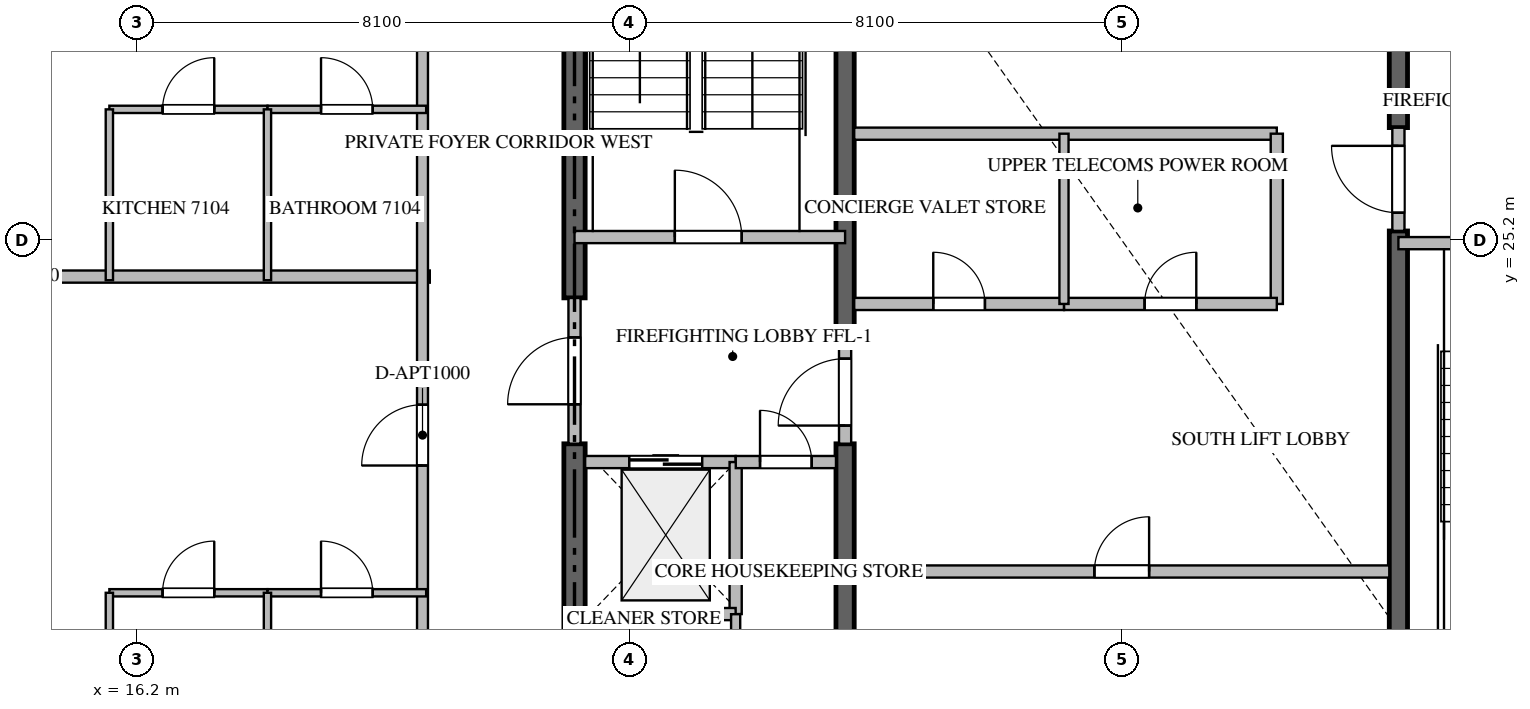
"""IFC4 building model, lengths in metres.
Left out: names, types, materials, properties, quantities, classifications, styles, units other than length and angle.
Written with IfcOpenShell. Run it as: python <this file> out.ifc"""

import sys

from ifc_helpers import new_model, si_unit, direction, frame, frame_2d, origin, place, context, subcontext, project, spatial, rectangle, extrude, source, transform, mapped, element, fill, save


model = new_model("IFC4")
c1 = context("Model", 3, precision=1e-05, world=origin(), true_north=direction((0.0, 1.0)))
c2 = subcontext(c1, "Body", "Model", "MODEL_VIEW")
j1 = project(units=[si_unit("LENGTHUNIT", "METRE"), si_unit("PLANEANGLEUNIT", "RADIAN")], contexts=[c1])
p1 = place(None, origin())
s1 = spatial("IfcSite", under=j1, at=p1, CompositionType="ELEMENT")
p2 = place(p1, origin())
s2 = spatial("IfcBuilding", under=s1, at=p2, CompositionType="ELEMENT")
p3 = place(p2, frame((0.0, 0.0, 283.6)))
s3 = spatial("IfcBuildingStorey", under=s2, at=p3, CompositionType="ELEMENT", Elevation=283.6)
p4 = place(p3, frame((23.4, 16.975, -0.26), z_axis=(0.0, 0.0, 1.0), x_axis=(0.0, 1.0, 0.0)))
e1 = element("IfcWall", 1, at=p4, inside=s3, PredefinedType="SHEAR", context=c2, shape_type="SweptSolid", body=[
    extrude(rectangle(XDim=4.875, YDim=0.35, at=frame_2d((2.438, 0.0))), origin(), (0.0, 0.0, 1.0), 3.668),
])
p5 = place(p3, frame((23.4, 24.25, -0.26), z_axis=(0.0, 0.0, 1.0), x_axis=(0.0, 1.0, 0.0)))
e2 = element("IfcWall", 2, at=p5, inside=s3, PredefinedType="SHEAR", context=c2, shape_type="SweptSolid", body=[
    extrude(rectangle(XDim=9.175, YDim=0.35, at=frame_2d((4.587, 0.0))), origin(), (0.0, 0.0, 1.0), 3.668),
])
p6 = place(p3, frame((27.85, 16.975, -0.26), z_axis=(0.0, 0.0, 1.0), x_axis=(0.0, 1.0, 0.0)))
e3 = element("IfcWall", 3, at=p6, inside=s3, PredefinedType="SHEAR", context=c2, shape_type="SweptSolid", body=[
    extrude(rectangle(XDim=4.875, YDim=0.3, at=frame_2d((2.438, 0.0))), origin(), (0.0, 0.0, 1.0), 3.668),
])
p7 = place(p3, frame((27.85, 23.55, -0.26), z_axis=(0.0, 0.0, 1.0), x_axis=(0.0, 1.0, 0.0)))
e4 = element("IfcWall", 4, at=p7, inside=s3, PredefinedType="SHEAR", context=c2, shape_type="SweptSolid", body=[
    extrude(rectangle(XDim=9.875, YDim=0.3, at=frame_2d((4.938, 0.0))), origin(), (0.0, 0.0, 1.0), 3.668),
])
p8 = place(p3, frame((36.95, 16.975, -0.26), z_axis=(0.0, 0.0, 1.0), x_axis=(0.0, 1.0, 0.0)))
e5 = element("IfcWall", 5, at=p8, inside=s3, PredefinedType="SHEAR", context=c2, shape_type="SweptSolid", body=[
    extrude(rectangle(XDim=8.375, YDim=0.3, at=frame_2d((4.188, 0.0))), origin(), (0.0, 0.0, 1.0), 3.668),
])
p9 = place(p3, frame((36.95, 27.05, -0.26), z_axis=(0.0, 0.0, 1.0), x_axis=(0.0, 1.0, 0.0)))
e6 = element("IfcWall", 6, at=p9, inside=s3, PredefinedType="SHEAR", context=c2, shape_type="SweptSolid", body=[
    extrude(rectangle(XDim=6.375, YDim=0.3, at=frame_2d((3.188, 0.0))), origin(), (0.0, 0.0, 1.0), 3.668),
])
p10 = place(p3, frame((23.4, 25.25, 0.0), z_axis=(0.0, 0.0, 1.0), x_axis=(1.0, 0.0, 0.0)))
e7 = element("IfcWall", 7, at=p10, inside=s3, PredefinedType="STANDARD", context=c2, shape_type="SweptSolid", body=[
    extrude(rectangle(XDim=4.45, YDim=0.2, at=frame_2d((2.225, 0.0))), origin(), (0.0, 0.0, 1.0), 3.41),
])
p11 = place(p10, frame((1.65, 0.0, 0.0)))
e8 = element("IfcOpeningElement", 8, at=p11, cuts=e7, PredefinedType="OPENING", context=c2, shape_type="SweptSolid", body=[
    extrude(rectangle(XDim=1.1, YDim=2.15, at=frame_2d((0.55, 1.075))), frame((0.0, 0.11, 0.0), z_axis=(0.0, -1.0, 0.0), x_axis=(1.0, 0.0, 0.0)), (0.0, 0.0, 1.0), 0.22),
])
p12 = place(p3, frame((36.95, 25.15, 0.0), z_axis=(0.0, 0.0, 1.0), x_axis=(1.0, 0.0, 0.0)))
e9 = element("IfcWall", 9, at=p12, inside=s3, PredefinedType="STANDARD", context=c2, shape_type="SweptSolid", body=[
    extrude(rectangle(XDim=4.45, YDim=0.2, at=frame_2d((2.225, 0.0))), origin(), (0.0, 0.0, 1.0), 3.41),
])
p13 = place(p12, frame((1.65, 0.0, 0.0)))
e10 = element("IfcOpeningElement", 10, at=p13, cuts=e9, PredefinedType="OPENING", context=c2, shape_type="SweptSolid", body=[
    extrude(rectangle(XDim=1.1, YDim=2.15, at=frame_2d((0.55, 1.075))), frame((0.0, 0.11, 0.0), z_axis=(0.0, -1.0, 0.0), x_axis=(1.0, 0.0, 0.0)), (0.0, 0.0, 1.0), 0.22),
])
p14 = place(p3, frame((23.575, 21.55, 0.0), z_axis=(0.0, 0.0, 1.0), x_axis=(1.0, 0.0, 0.0)))
e11 = element("IfcWall", 11, at=p14, inside=s3, PredefinedType="STANDARD", context=c2, shape_type="SweptSolid", body=[
    extrude(rectangle(XDim=2.475, YDim=0.2, at=frame_2d((1.238, 0.0))), origin(), (0.0, 0.0, 1.0), 3.41),
])
p15 = place(p14, frame((0.725, 0.0, 0.0)))
e12 = element("IfcOpeningElement", 12, at=p15, cuts=e11, PredefinedType="OPENING", context=c2, shape_type="SweptSolid", body=[
    extrude(rectangle(XDim=1.2, YDim=2.2, at=frame_2d((0.6, 1.1))), frame((0.0, 0.11, 0.0), z_axis=(0.0, -1.0, 0.0), x_axis=(1.0, 0.0, 0.0)), (0.0, 0.0, 1.0), 0.22),
])
p16 = place(p3, frame((26.05, 19.05, 0.0), z_axis=(0.0, 0.0, 1.0), x_axis=(0.0, 1.0, 0.0)))
e13 = element("IfcWall", 13, at=p16, inside=s3, PredefinedType="STANDARD", context=c2, shape_type="SweptSolid", body=[
    extrude(rectangle(XDim=2.5, YDim=0.2, at=frame_2d((1.25, 0.0))), origin(), (0.0, 0.0, 1.0), 3.41),
])
p17 = place(p3, frame((23.575, 19.05, 0.0), z_axis=(0.0, 0.0, 1.0), x_axis=(1.0, 0.0, 0.0)))
e14 = element("IfcWall", 14, at=p17, inside=s3, PredefinedType="STANDARD", context=c2, shape_type="SweptSolid", body=[
    extrude(rectangle(XDim=2.475, YDim=0.2, at=frame_2d((1.238, 0.0))), origin(), (0.0, 0.0, 1.0), 3.41),
])
p18 = place(p3, frame((26.052, 21.55, 0.0), z_axis=(0.0, 0.0, 1.0), x_axis=(1.0, 0.0, 0.0)))
e15 = element("IfcWall", 15, at=p18, inside=s3, PredefinedType="STANDARD", context=c2, shape_type="SweptSolid", body=[
    extrude(rectangle(XDim=1.648, YDim=0.2, at=frame_2d((0.824, 0.0))), origin(), (0.0, 0.0, 1.0), 3.41),
])
p19 = place(p18, frame((0.399, 0.0, 0.0)))
e16 = element("IfcOpeningElement", 16, at=p19, cuts=e15, PredefinedType="OPENING", context=c2, shape_type="SweptSolid", body=[
    extrude(rectangle(XDim=0.85, YDim=2.1, at=frame_2d((0.425, 1.05))), frame((0.0, 0.11, 0.0), z_axis=(0.0, -1.0, 0.0), x_axis=(1.0, 0.0, 0.0)), (0.0, 0.0, 1.0), 0.22),
])
p20 = place(p3, frame((23.4, 21.852, 0.0), z_axis=(0.0, 0.0, 1.0), x_axis=(0.0, 1.0, 0.0)))
e17 = element("IfcWall", 17, at=p20, inside=s3, PredefinedType="STANDARD", context=c2, shape_type="SweptSolid", body=[
    extrude(rectangle(XDim=2.396, YDim=0.2, at=frame_2d((1.198, 0.0))), origin(), (0.0, 0.0, 1.0), 3.41),
])
p21 = place(p20, frame((0.648, 0.0, 0.0)))
e18 = element("IfcOpeningElement", 18, at=p21, cuts=e17, PredefinedType="OPENING", context=c2, shape_type="SweptSolid", body=[
    extrude(rectangle(XDim=1.1, YDim=2.15, at=frame_2d((0.55, 1.075))), frame((0.0, 0.11, 0.0), z_axis=(0.0, -1.0, 0.0), x_axis=(1.0, 0.0, 0.0)), (0.0, 0.0, 1.0), 0.22),
])
p22 = place(p3, frame((27.85, 21.852, 0.0), z_axis=(0.0, 0.0, 1.0), x_axis=(0.0, 1.0, 0.0)))
e19 = element("IfcWall", 19, at=p22, inside=s3, PredefinedType="STANDARD", context=c2, shape_type="SweptSolid", body=[
    extrude(rectangle(XDim=1.696, YDim=0.2, at=frame_2d((0.848, 0.0))), origin(), (0.0, 0.0, 1.0), 3.41),
])
p23 = place(p22, frame((0.298, 0.0, 0.0)))
e20 = element("IfcOpeningElement", 20, at=p23, cuts=e19, PredefinedType="OPENING", context=c2, shape_type="SweptSolid", body=[
    extrude(rectangle(XDim=1.1, YDim=2.15, at=frame_2d((0.55, 1.075))), frame((0.0, 0.11, 0.0), z_axis=(0.0, -1.0, 0.0), x_axis=(1.0, 0.0, 0.0)), (0.0, 0.0, 1.0), 0.22),
])
p24 = place(p3, frame((36.95, 25.352, 0.0), z_axis=(0.0, 0.0, 1.0), x_axis=(0.0, 1.0, 0.0)))
e21 = element("IfcWall", 21, at=p24, inside=s3, PredefinedType="STANDARD", context=c2, shape_type="SweptSolid", body=[
    extrude(rectangle(XDim=1.696, YDim=0.2, at=frame_2d((0.848, 0.0))), origin(), (0.0, 0.0, 1.0), 3.41),
])
p25 = place(p24, frame((0.298, 0.0, 0.0)))
e22 = element("IfcOpeningElement", 22, at=p25, cuts=e21, PredefinedType="OPENING", context=c2, shape_type="SweptSolid", body=[
    extrude(rectangle(XDim=1.1, YDim=2.15, at=frame_2d((0.55, 1.075))), frame((0.0, 0.11, 0.0), z_axis=(0.0, -1.0, 0.0), x_axis=(1.0, 0.0, 0.0)), (0.0, 0.0, 1.0), 0.22),
])
p26 = place(p3, frame((26.05, 16.975, 0.0), z_axis=(0.0, 0.0, 1.0), x_axis=(0.0, 1.0, 0.0)))
e23 = element("IfcWall", 23, at=p26, inside=s3, PredefinedType="PARTITIONING", context=c2, shape_type="SweptSolid", body=[
    extrude(rectangle(XDim=2.073, YDim=0.15, at=frame_2d((1.037, 0.0))), origin(), (0.0, 0.0, 1.0), 3.41),
])
p27 = place(p26, frame((0.611, 0.0, 0.0)))
e24 = element("IfcOpeningElement", 24, at=p27, cuts=e23, PredefinedType="OPENING", context=c2, shape_type="SweptSolid", body=[
    extrude(rectangle(XDim=0.85, YDim=2.1, at=frame_2d((0.425, 1.05))), frame((0.0, 0.085, 0.0), z_axis=(0.0, -1.0, 0.0), x_axis=(1.0, 0.0, 0.0)), (0.0, 0.0, 1.0), 0.17),
])
p28 = place(p3, frame((28.0, 19.75, 0.0), z_axis=(0.0, 0.0, 1.0), x_axis=(1.0, 0.0, 0.0)))
e25 = element("IfcWall", 25, at=p28, inside=s3, PredefinedType="STANDARD", context=c2, shape_type="SweptSolid", body=[
    extrude(rectangle(XDim=8.8, YDim=0.2, at=frame_2d((4.4, 0.0))), origin(), (0.0, 0.0, 1.0), 3.41),
])
p29 = place(p28, frame((3.95, 0.0, 0.0)))
e26 = element("IfcOpeningElement", 26, at=p29, cuts=e25, PredefinedType="OPENING", context=c2, shape_type="SweptSolid", body=[
    extrude(rectangle(XDim=0.9, YDim=2.1, at=frame_2d((0.45, 1.05))), frame((0.0, 0.11, 0.0), z_axis=(0.0, -1.0, 0.0), x_axis=(1.0, 0.0, 0.0)), (0.0, 0.0, 1.0), 0.22),
])
p30 = place(p3, frame((28.0, 26.95, 0.0), z_axis=(0.0, 0.0, 1.0), x_axis=(1.0, 0.0, 0.0)))
e27 = element("IfcWall", 27, at=p30, inside=s3, PredefinedType="STANDARD", context=c2, shape_type="SweptSolid", body=[
    extrude(rectangle(XDim=6.95, YDim=0.2, at=frame_2d((3.475, 0.0))), origin(), (0.0, 0.0, 1.0), 3.41),
])
p31 = place(p3, frame((34.95, 24.15, 0.0), z_axis=(0.0, 0.0, 1.0), x_axis=(0.0, 1.0, 0.0)))
e28 = element("IfcWall", 28, at=p31, inside=s3, PredefinedType="STANDARD", context=c2, shape_type="SweptSolid", body=[
    extrude(rectangle(XDim=2.8, YDim=0.2, at=frame_2d((1.4, 0.0))), origin(), (0.0, 0.0, 1.0), 3.41),
])
p32 = place(p3, frame((28.0, 24.15, 0.0), z_axis=(0.0, 0.0, 1.0), x_axis=(1.0, 0.0, 0.0)))
e29 = element("IfcWall", 29, at=p32, inside=s3, PredefinedType="STANDARD", context=c2, shape_type="SweptSolid", body=[
    extrude(rectangle(XDim=3.45, YDim=0.2, at=frame_2d((1.725, 0.0))), origin(), (0.0, 0.0, 1.0), 3.41),
])
p33 = place(p32, frame((1.3, 0.0, 0.0)))
e30 = element("IfcOpeningElement", 30, at=p33, cuts=e29, PredefinedType="OPENING", context=c2, shape_type="SweptSolid", body=[
    extrude(rectangle(XDim=0.85, YDim=2.1, at=frame_2d((0.425, 1.05))), frame((0.0, 0.11, 0.0), z_axis=(0.0, -1.0, 0.0), x_axis=(1.0, 0.0, 0.0)), (0.0, 0.0, 1.0), 0.22),
])
p34 = place(p3, frame((31.452, 24.15, 0.0), z_axis=(0.0, 0.0, 1.0), x_axis=(1.0, 0.0, 0.0)))
e31 = element("IfcWall", 31, at=p34, inside=s3, PredefinedType="STANDARD", context=c2, shape_type="SweptSolid", body=[
    extrude(rectangle(XDim=3.498, YDim=0.2, at=frame_2d((1.749, 0.0))), origin(), (0.0, 0.0, 1.0), 3.41),
])
p35 = place(p34, frame((1.324, 0.0, 0.0)))
e32 = element("IfcOpeningElement", 32, at=p35, cuts=e31, PredefinedType="OPENING", context=c2, shape_type="SweptSolid", body=[
    extrude(rectangle(XDim=0.85, YDim=2.1, at=frame_2d((0.425, 1.05))), frame((0.0, 0.11, 0.0), z_axis=(0.0, -1.0, 0.0), x_axis=(1.0, 0.0, 0.0)), (0.0, 0.0, 1.0), 0.22),
])
p36 = place(p3, frame((31.45, 24.15, 0.0), z_axis=(0.0, 0.0, 1.0), x_axis=(0.0, 1.0, 0.0)))
e33 = element("IfcWall", 33, at=p36, inside=s3, PredefinedType="PARTITIONING", context=c2, shape_type="SweptSolid", body=[
    extrude(rectangle(XDim=2.8, YDim=0.15, at=frame_2d((1.4, 0.0))), origin(), (0.0, 0.0, 1.0), 3.41),
])
p37 = place(p3, frame((7.482, 24.6, 0.0), z_axis=(0.0, 0.0, 1.0), x_axis=(1.0, 0.0, 0.0)))
e34 = element("IfcWall", 34, at=p37, inside=s3, PredefinedType="PARTITIONING", context=c2, shape_type="SweptSolid", body=[
    extrude(rectangle(XDim=13.538, YDim=0.2, at=frame_2d((6.769, 0.0))), origin(), (0.0, 0.0, 1.0), 3.41),
])
p38 = place(p3, frame((20.9, 16.8, 0.0), z_axis=(0.0, 0.0, 1.0), x_axis=(0.0, 1.0, 0.0)))
e35 = element("IfcWall", 35, at=p38, inside=s3, PredefinedType="PARTITIONING", context=c2, shape_type="SweptSolid", body=[
    extrude(rectangle(XDim=16.8, YDim=0.18, at=frame_2d((8.4, 0.0))), origin(), (0.0, 0.0, 1.0), 3.41),
])
p39 = place(p38, frame((4.693, 0.0, 0.0)))
e36 = element("IfcOpeningElement", 36, at=p39, cuts=e35, PredefinedType="OPENING", context=c2, shape_type="SweptSolid", body=[
    extrude(rectangle(XDim=1.0, YDim=2.15, at=frame_2d((0.5, 1.075))), frame((0.0, 0.1, 0.0), z_axis=(0.0, -1.0, 0.0), x_axis=(1.0, 0.0, 0.0)), (0.0, 0.0, 1.0), 0.2),
])
p40 = place(p38, frame((13.13, 0.0, 0.0)))
e37 = element("IfcOpeningElement", 37, at=p40, cuts=e35, PredefinedType="OPENING", context=c2, shape_type="SweptSolid", body=[
    extrude(rectangle(XDim=1.0, YDim=2.15, at=frame_2d((0.5, 1.075))), frame((0.0, 0.1, 0.0), z_axis=(0.0, -1.0, 0.0), x_axis=(1.0, 0.0, 0.0)), (0.0, 0.0, 1.0), 0.2),
])
p41 = place(p3, frame((15.75, 19.4, 0.0), z_axis=(0.0, 0.0, 1.0), x_axis=(1.0, 0.0, 0.0)))
e38 = element("IfcWall", 38, at=p41, inside=s3, PredefinedType="PARTITIONING", context=c2, shape_type="SweptSolid", body=[
    extrude(rectangle(XDim=2.6, YDim=0.12, at=frame_2d((1.3, 0.0))), origin(), (0.0, 0.0, 1.0), 3.41),
])
p42 = place(p41, frame((0.875, 0.0, 0.0)))
e39 = element("IfcOpeningElement", 39, at=p42, cuts=e38, PredefinedType="OPENING", context=c2, shape_type="SweptSolid", body=[
    extrude(rectangle(XDim=0.85, YDim=2.1, at=frame_2d((0.425, 1.05))), frame((0.0, 0.07, 0.0), z_axis=(0.0, -1.0, 0.0), x_axis=(1.0, 0.0, 0.0)), (0.0, 0.0, 1.0), 0.14),
])
p43 = place(p3, frame((18.352, 19.4, 0.0), z_axis=(0.0, 0.0, 1.0), x_axis=(1.0, 0.0, 0.0)))
e40 = element("IfcWall", 40, at=p43, inside=s3, PredefinedType="PARTITIONING", context=c2, shape_type="SweptSolid", body=[
    extrude(rectangle(XDim=2.608, YDim=0.12, at=frame_2d((1.304, 0.0))), origin(), (0.0, 0.0, 1.0), 3.41),
])
p44 = place(p43, frame((0.879, 0.0, 0.0)))
e41 = element("IfcOpeningElement", 41, at=p44, cuts=e40, PredefinedType="OPENING", context=c2, shape_type="SweptSolid", body=[
    extrude(rectangle(XDim=0.85, YDim=2.1, at=frame_2d((0.425, 1.05))), frame((0.0, 0.07, 0.0), z_axis=(0.0, -1.0, 0.0), x_axis=(1.0, 0.0, 0.0)), (0.0, 0.0, 1.0), 0.14),
])
p45 = place(p3, frame((18.35, 16.74, 0.0), z_axis=(0.0, 0.0, 1.0), x_axis=(0.0, 1.0, 0.0)))
e42 = element("IfcWall", 42, at=p45, inside=s3, PredefinedType="PARTITIONING", context=c2, shape_type="SweptSolid", body=[
    extrude(rectangle(XDim=2.66, YDim=0.12, at=frame_2d((1.33, 0.0))), origin(), (0.0, 0.0, 1.0), 3.41),
])
p46 = place(p3, frame((15.75, 16.74, 0.0), z_axis=(0.0, 0.0, 1.0), x_axis=(0.0, 1.0, 0.0)))
e43 = element("IfcWall", 43, at=p46, inside=s3, PredefinedType="PARTITIONING", context=c2, shape_type="SweptSolid", body=[
    extrude(rectangle(XDim=2.66, YDim=0.12, at=frame_2d((1.33, 0.0))), origin(), (0.0, 0.0, 1.0), 2.245),
])
p47 = place(p3, frame((15.75, 27.35, 0.0), z_axis=(0.0, 0.0, 1.0), x_axis=(1.0, 0.0, 0.0)))
e44 = element("IfcWall", 44, at=p47, inside=s3, PredefinedType="PARTITIONING", context=c2, shape_type="SweptSolid", body=[
    extrude(rectangle(XDim=2.6, YDim=0.12, at=frame_2d((1.3, 0.0))), origin(), (0.0, 0.0, 1.0), 3.41),
])
p48 = place(p47, frame((0.875, 0.0, 0.0)))
e45 = element("IfcOpeningElement", 45, at=p48, cuts=e44, PredefinedType="OPENING", context=c2, shape_type="SweptSolid", body=[
    extrude(rectangle(XDim=0.85, YDim=2.1, at=frame_2d((0.425, 1.05))), frame((0.0, 0.07, 0.0), z_axis=(0.0, -1.0, 0.0), x_axis=(1.0, 0.0, 0.0)), (0.0, 0.0, 1.0), 0.14),
])
p49 = place(p3, frame((18.352, 27.35, 0.0), z_axis=(0.0, 0.0, 1.0), x_axis=(1.0, 0.0, 0.0)))
e46 = element("IfcWall", 46, at=p49, inside=s3, PredefinedType="PARTITIONING", context=c2, shape_type="SweptSolid", body=[
    extrude(rectangle(XDim=2.608, YDim=0.12, at=frame_2d((1.304, 0.0))), origin(), (0.0, 0.0, 1.0), 3.41),
])
p50 = place(p49, frame((0.879, 0.0, 0.0)))
e47 = element("IfcOpeningElement", 47, at=p50, cuts=e46, PredefinedType="OPENING", context=c2, shape_type="SweptSolid", body=[
    extrude(rectangle(XDim=0.85, YDim=2.1, at=frame_2d((0.425, 1.05))), frame((0.0, 0.07, 0.0), z_axis=(0.0, -1.0, 0.0), x_axis=(1.0, 0.0, 0.0)), (0.0, 0.0, 1.0), 0.14),
])
for number, where, z_axis, x_axis in (
    (48, (18.35, 24.54, 0.0), (0.0, 0.0, 1.0), (0.0, 1.0, 0.0)),
    (49, (15.75, 24.54, 0.0), (0.0, 0.0, 1.0), (0.0, 1.0, 0.0)),
):
    element("IfcWall", number, at=place(p3, frame(where, z_axis=z_axis, x_axis=x_axis)), inside=s3, PredefinedType="PARTITIONING", context=c2, shape_type="SweptSolid", body=[
        extrude(rectangle(XDim=2.81, YDim=0.12, at=frame_2d((1.405, 0.0))), origin(), (0.0, 0.0, 1.0), 3.41),
    ])
m1 = source(origin(), c2, "Body", "SweptSolid", [
    extrude(rectangle(XDim=1.1, YDim=2.15, at=frame_2d((0.55, 1.075))), frame((0.0, 0.025, 0.0), z_axis=(0.0, -1.0, 0.0), x_axis=(1.0, 0.0, 0.0)), (0.0, 0.0, 1.0), 0.05),
])
p51 = place(p11, origin())
e50 = element("IfcDoor", 50, at=p51, inside=s3, OperationType="SINGLE_SWING_LEFT", PredefinedType="DOOR", context=c2, shape_type="MappedRepresentation", body=[
    mapped(m1, transform((0.0, 0.0, 0.0), scale=1.0)),
])
fill(e8, e50)
m2 = source(origin(), c2, "Body", "SweptSolid", [
    extrude(rectangle(XDim=1.2, YDim=2.2, at=frame_2d((0.6, 1.1))), frame((0.0, 0.025, 0.0), z_axis=(0.0, -1.0, 0.0), x_axis=(1.0, 0.0, 0.0)), (0.0, 0.0, 1.0), 0.05),
])
p52 = place(p15, origin())
e51 = element("IfcDoor", 51, at=p52, inside=s3, OperationType="DOUBLE_DOOR_SLIDING", PredefinedType="DOOR", context=c2, shape_type="MappedRepresentation", body=[
    mapped(m2, transform((0.0, 0.0, 0.0), scale=1.0)),
])
fill(e12, e51)
m3 = source(origin(), c2, "Body", "SweptSolid", [
    extrude(rectangle(XDim=0.85, YDim=2.1, at=frame_2d((0.425, 1.05))), frame((0.0, 0.025, 0.0), z_axis=(0.0, -1.0, 0.0), x_axis=(1.0, 0.0, 0.0)), (0.0, 0.0, 1.0), 0.05),
])
p53 = place(p19, origin())
e52 = element("IfcDoor", 52, at=p53, inside=s3, OperationType="SINGLE_SWING_LEFT", PredefinedType="DOOR", context=c2, shape_type="MappedRepresentation", body=[
    mapped(m3, transform((0.0, 0.0, 0.0), scale=1.0)),
])
fill(e16, e52)
p54 = place(p21, origin())
e53 = element("IfcDoor", 53, at=p54, inside=s3, OperationType="SINGLE_SWING_LEFT", PredefinedType="DOOR", context=c2, shape_type="MappedRepresentation", body=[
    mapped(m1, transform((0.0, 0.0, 0.0), scale=1.0)),
])
fill(e18, e53)
p55 = place(p23, origin())
e54 = element("IfcDoor", 54, at=p55, inside=s3, OperationType="SINGLE_SWING_LEFT", PredefinedType="DOOR", context=c2, shape_type="MappedRepresentation", body=[
    mapped(m1, transform((0.0, 0.0, 0.0), scale=1.0)),
])
fill(e20, e54)
p56 = place(p25, origin())
e55 = element("IfcDoor", 55, at=p56, inside=s3, OperationType="SINGLE_SWING_RIGHT", PredefinedType="DOOR", context=c2, shape_type="MappedRepresentation", body=[
    mapped(m1, transform((0.0, 0.0, 0.0), scale=1.0)),
])
fill(e22, e55)
m4 = source(origin(), c2, "Body", "SweptSolid", [
    extrude(rectangle(XDim=0.9, YDim=2.1, at=frame_2d((0.45, 1.05))), frame((0.0, 0.025, 0.0), z_axis=(0.0, -1.0, 0.0), x_axis=(1.0, 0.0, 0.0)), (0.0, 0.0, 1.0), 0.05),
])
p57 = place(p29, origin())
e56 = element("IfcDoor", 56, at=p57, inside=s3, OperationType="SINGLE_SWING_RIGHT", PredefinedType="DOOR", context=c2, shape_type="MappedRepresentation", body=[
    mapped(m4, transform((0.0, 0.0, 0.0), scale=1.0)),
])
fill(e26, e56)
p58 = place(p33, origin())
e57 = element("IfcDoor", 57, at=p58, inside=s3, OperationType="SINGLE_SWING_LEFT", PredefinedType="DOOR", context=c2, shape_type="MappedRepresentation", body=[
    mapped(m3, transform((0.0, 0.0, 0.0), scale=1.0)),
])
fill(e30, e57)
p59 = place(p35, origin())
e58 = element("IfcDoor", 58, at=p59, inside=s3, OperationType="SINGLE_SWING_RIGHT", PredefinedType="DOOR", context=c2, shape_type="MappedRepresentation", body=[
    mapped(m3, transform((0.0, 0.0, 0.0), scale=1.0)),
])
fill(e32, e58)
m5 = source(origin(), c2, "Body", "SweptSolid", [
    extrude(rectangle(XDim=1.0, YDim=2.15, at=frame_2d((0.5, 1.075))), frame((0.0, 0.025, 0.0), z_axis=(0.0, -1.0, 0.0), x_axis=(1.0, 0.0, 0.0)), (0.0, 0.0, 1.0), 0.05),
])
p60 = place(p39, origin())
e59 = element("IfcDoor", 59, at=p60, inside=s3, OperationType="SINGLE_SWING_LEFT", PredefinedType="DOOR", context=c2, shape_type="MappedRepresentation", body=[
    mapped(m5, transform((0.0, 0.0, 0.0), scale=1.0)),
])
fill(e36, e59)
p61 = place(p42, origin())
e60 = element("IfcDoor", 60, at=p61, inside=s3, OperationType="SINGLE_SWING_RIGHT", PredefinedType="DOOR", context=c2, shape_type="MappedRepresentation", body=[
    mapped(m3, transform((0.0, 0.0, 0.0), scale=1.0)),
])
fill(e39, e60)
p62 = place(p44, origin())
e61 = element("IfcDoor", 61, at=p62, inside=s3, OperationType="SINGLE_SWING_LEFT", PredefinedType="DOOR", context=c2, shape_type="MappedRepresentation", body=[
    mapped(m3, transform((0.0, 0.0, 0.0), scale=1.0)),
])
fill(e41, e61)
p63 = place(p48, origin())
e62 = element("IfcDoor", 62, at=p63, inside=s3, OperationType="SINGLE_SWING_RIGHT", PredefinedType="DOOR", context=c2, shape_type="MappedRepresentation", body=[
    mapped(m3, transform((0.0, 0.0, 0.0), scale=1.0)),
])
fill(e45, e62)
p64 = place(p50, origin())
e63 = element("IfcDoor", 63, at=p64, inside=s3, OperationType="SINGLE_SWING_LEFT", PredefinedType="DOOR", context=c2, shape_type="MappedRepresentation", body=[
    mapped(m3, transform((0.0, 0.0, 0.0), scale=1.0)),
])
fill(e47, e63)
save(model, sys.argv[1])
